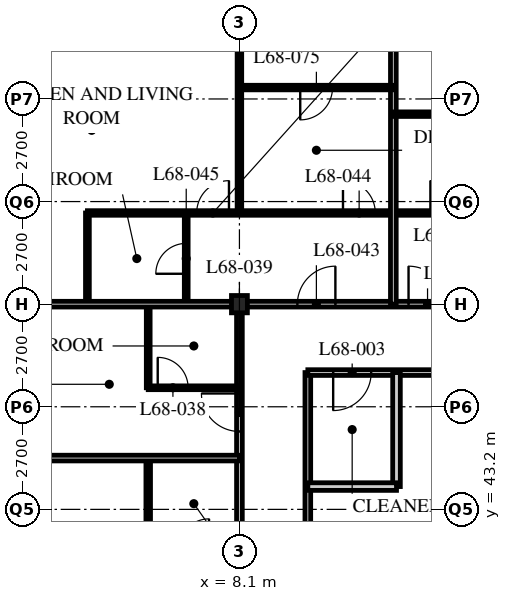
"""IFC4 building model, lengths in metres.
Left out: names, types, materials, properties, quantities, classifications, styles, units other than length and angle.
Written with IfcOpenShell. Run it as: python <this file> out.ifc"""

import sys

from ifc_helpers import new_model, si_unit, direction, frame, frame_2d, origin, origin_2d, place, context, subcontext, project, spatial, rectangle, i_section, extrude, element, fill, save


model = new_model("IFC4")
c1 = context("Model", 3, precision=1e-05, world=origin(), true_north=direction((0.0, 1.0)))
c2 = subcontext(c1, "Body", "Model", "MODEL_VIEW")
j1 = project(units=[si_unit("LENGTHUNIT", "METRE"), si_unit("PLANEANGLEUNIT", "RADIAN")], contexts=[c1])
p1 = place(None, origin())
s1 = spatial("IfcSite", under=j1, at=p1, CompositionType="ELEMENT")
p2 = place(p1, origin())
s2 = spatial("IfcBuilding", under=s1, at=p2, CompositionType="ELEMENT")
p3 = place(p2, frame((0.0, 0.0, 265.8)))
s3 = spatial("IfcBuildingStorey", under=s2, at=p3, CompositionType="ELEMENT", Elevation=265.8)
p4 = place(p3, frame((8.1, 48.6, 0.0), z_axis=(0.0, 0.0, 1.0), x_axis=(1.0, 0.0, 0.0)))
e1 = element("IfcColumn", 1, at=p4, inside=s3, PredefinedType="COLUMN", context=c2, shape_type="SweptSolid", body=[
    extrude(i_section(OverallWidth=0.418, OverallDepth=0.456, WebThickness=0.042, FlangeThickness=0.067, FilletRadius=0.015, at=origin_2d()), origin(), (0.0, 0.0, 1.0), 3.9),
])
p5 = place(p3, frame((8.1, 48.6, 0.0), z_axis=(0.0, 0.0, 1.0), x_axis=(1.0, 0.0, 0.0)))
e2 = element("IfcWall", 2, at=p5, inside=s3, PredefinedType="PARTITIONING", context=c2, shape_type="SweptSolid", body=[
    extrude(rectangle(XDim=28.35, YDim=0.15, at=frame_2d((14.175, 0.0))), origin(), (0.0, 0.0, 1.0), 3.078),
])
p6 = place(p5, frame((4.45, 0.0, 0.0)))
e3 = element("IfcOpeningElement", 3, at=p6, cuts=e2, PredefinedType="OPENING", context=c2, shape_type="SweptSolid", body=[
    extrude(rectangle(XDim=1.0, YDim=2.1, at=frame_2d((0.5, 1.05))), frame((0.0, 0.085, 0.0), z_axis=(0.0, -1.0, 0.0), x_axis=(1.0, 0.0, 0.0)), (0.0, 0.0, 1.0), 0.17),
])
p7 = place(p5, frame((20.65, 0.0, 0.0)))
e4 = element("IfcOpeningElement", 4, at=p7, cuts=e2, PredefinedType="OPENING", context=c2, shape_type="SweptSolid", body=[
    extrude(rectangle(XDim=1.0, YDim=2.1, at=frame_2d((0.5, 1.05))), frame((0.0, 0.085, 0.0), z_axis=(0.0, -1.0, 0.0), x_axis=(1.0, 0.0, 0.0)), (0.0, 0.0, 1.0), 0.17),
])
p8 = place(p5, frame((1.525, 0.0, 0.0)))
e5 = element("IfcOpeningElement", 5, at=p8, cuts=e2, PredefinedType="OPENING", context=c2, shape_type="SweptSolid", body=[
    extrude(rectangle(XDim=1.0, YDim=2.1, at=frame_2d((0.5, 1.05))), frame((0.0, 0.085, 0.0), z_axis=(0.0, -1.0, 0.0), x_axis=(1.0, 0.0, 0.0)), (0.0, 0.0, 1.0), 0.17),
])
p9 = place(p3, frame((8.1, 22.5, 0.0), z_axis=(0.0, 0.0, 1.0), x_axis=(0.0, 1.0, 0.0)))
e6 = element("IfcWall", 6, at=p9, inside=s3, PredefinedType="PARTITIONING", context=c2, shape_type="SweptSolid", body=[
    extrude(rectangle(XDim=26.1, YDim=0.15, at=frame_2d((13.05, 0.0))), origin(), (0.0, 0.0, 1.0), 3.078),
])
p10 = place(p9, frame((2.65, 0.0, 0.0)))
e7 = element("IfcOpeningElement", 7, at=p10, cuts=e6, PredefinedType="OPENING", context=c2, shape_type="SweptSolid", body=[
    extrude(rectangle(XDim=1.0, YDim=2.1, at=frame_2d((0.5, 1.05))), frame((0.0, 0.085, 0.0), z_axis=(0.0, -1.0, 0.0), x_axis=(1.0, 0.0, 0.0)), (0.0, 0.0, 1.0), 0.17),
])
p11 = place(p9, frame((22.75, 0.0, 0.0)))
e8 = element("IfcOpeningElement", 8, at=p11, cuts=e6, PredefinedType="OPENING", context=c2, shape_type="SweptSolid", body=[
    extrude(rectangle(XDim=1.0, YDim=2.1, at=frame_2d((0.5, 1.05))), frame((0.0, 0.085, 0.0), z_axis=(0.0, -1.0, 0.0), x_axis=(1.0, 0.0, 0.0)), (0.0, 0.0, 1.0), 0.17),
])
p12 = place(p3, frame((9.9, 24.3, 0.0), z_axis=(0.0, 0.0, 1.0), x_axis=(0.0, 1.0, 0.0)))
e9 = element("IfcWall", 9, at=p12, inside=s3, PredefinedType="PARTITIONING", context=c2, shape_type="SweptSolid", body=[
    extrude(rectangle(XDim=22.5, YDim=0.15, at=frame_2d((11.25, 0.0))), origin(), (0.0, 0.0, 1.0), 3.69),
])
p13 = place(p12, frame((3.55, 0.0, 0.0)))
e10 = element("IfcOpeningElement", 10, at=p13, cuts=e9, PredefinedType="OPENING", context=c2, shape_type="SweptSolid", body=[
    extrude(rectangle(XDim=1.0, YDim=2.1, at=frame_2d((0.5, 1.05))), frame((0.0, 0.085, 0.0), z_axis=(0.0, -1.0, 0.0), x_axis=(1.0, 0.0, 0.0)), (0.0, 0.0, 1.0), 0.17),
])
p14 = place(p12, frame((11.65, 0.0, 0.0)))
e11 = element("IfcOpeningElement", 11, at=p14, cuts=e9, PredefinedType="OPENING", context=c2, shape_type="SweptSolid", body=[
    extrude(rectangle(XDim=1.0, YDim=2.1, at=frame_2d((0.5, 1.05))), frame((0.0, 0.085, 0.0), z_axis=(0.0, -1.0, 0.0), x_axis=(1.0, 0.0, 0.0)), (0.0, 0.0, 1.0), 0.17),
])
p15 = place(p3, frame((9.9, 46.8, 0.0), z_axis=(0.0, 0.0, 1.0), x_axis=(1.0, 0.0, 0.0)))
e12 = element("IfcWall", 12, at=p15, inside=s3, PredefinedType="PARTITIONING", context=c2, shape_type="SweptSolid", body=[
    extrude(rectangle(XDim=17.24, YDim=0.15, at=frame_2d((8.62, 0.0))), origin(), (0.0, 0.0, 1.0), 3.69),
])
p16 = place(p15, frame((0.667, 0.0, 0.0)))
e13 = element("IfcOpeningElement", 13, at=p16, cuts=e12, PredefinedType="OPENING", context=c2, shape_type="SweptSolid", body=[
    extrude(rectangle(XDim=1.0, YDim=2.1, at=frame_2d((0.5, 1.05))), frame((0.0, 0.085, 0.0), z_axis=(0.0, -1.0, 0.0), x_axis=(1.0, 0.0, 0.0)), (0.0, 0.0, 1.0), 0.17),
])
p17 = place(p15, frame((3.817, 0.0, 0.0)))
e14 = element("IfcOpeningElement", 14, at=p17, cuts=e12, PredefinedType="OPENING", context=c2, shape_type="SweptSolid", body=[
    extrude(rectangle(XDim=1.0, YDim=2.1, at=frame_2d((0.5, 1.05))), frame((0.0, 0.085, 0.0), z_axis=(0.0, -1.0, 0.0), x_axis=(1.0, 0.0, 0.0)), (0.0, 0.0, 1.0), 0.17),
])
p18 = place(p15, frame((8.102, 0.0, 0.0)))
e15 = element("IfcOpeningElement", 15, at=p18, cuts=e12, PredefinedType="OPENING", context=c2, shape_type="SweptSolid", body=[
    extrude(rectangle(XDim=1.0, YDim=2.1, at=frame_2d((0.5, 1.05))), frame((0.0, 0.085, 0.0), z_axis=(0.0, -1.0, 0.0), x_axis=(1.0, 0.0, 0.0)), (0.0, 0.0, 1.0), 0.17),
])
p19 = place(p15, frame((13.577, 0.0, 0.0)))
e16 = element("IfcOpeningElement", 16, at=p19, cuts=e12, PredefinedType="OPENING", context=c2, shape_type="SweptSolid", body=[
    extrude(rectangle(XDim=1.0, YDim=2.1, at=frame_2d((0.5, 1.05))), frame((0.0, 0.085, 0.0), z_axis=(0.0, -1.0, 0.0), x_axis=(1.0, 0.0, 0.0)), (0.0, 0.0, 1.0), 0.17),
])
p20 = place(p3, frame((12.233, 46.8, 0.0), z_axis=(0.0, 0.0, 1.0), x_axis=(0.0, -1.0, 0.0)))
e17 = element("IfcWall", 17, at=p20, inside=s3, PredefinedType="SOLIDWALL", context=c2, shape_type="SweptSolid", body=[
    extrude(rectangle(XDim=3.0, YDim=0.2, at=frame_2d((1.5, 0.0))), origin(), (0.0, 0.0, 1.0), 3.69),
])
p21 = place(p3, frame((9.9, 43.8, 0.0), z_axis=(0.0, 0.0, 1.0), x_axis=(1.0, 0.0, 0.0)))
e18 = element("IfcWall", 18, at=p21, inside=s3, PredefinedType="SOLIDWALL", context=c2, shape_type="SweptSolid", body=[
    extrude(rectangle(XDim=2.333, YDim=0.2, at=frame_2d((1.167, 0.0))), origin(), (0.0, 0.0, 1.0), 3.69),
])
p22 = place(p3, frame((5.7, 22.5, 0.0), z_axis=(0.0, 0.0, 1.0), x_axis=(0.0, 1.0, 0.0)))
e19 = element("IfcWall", 19, at=p22, inside=s3, PredefinedType="PARTITIONING", context=c2, shape_type="SweptSolid", body=[
    extrude(rectangle(XDim=22.05, YDim=0.12, at=frame_2d((11.025, 0.0))), origin(), (0.0, 0.0, 1.0), 3.69),
])
p23 = place(p22, frame((0.975, 0.0, 0.0)))
e20 = element("IfcOpeningElement", 20, at=p23, cuts=e19, PredefinedType="OPENING", context=c2, shape_type="SweptSolid", body=[
    extrude(rectangle(XDim=0.85, YDim=2.1, at=frame_2d((0.425, 1.05))), frame((0.0, 0.07, 0.0), z_axis=(0.0, -1.0, 0.0), x_axis=(1.0, 0.0, 0.0)), (0.0, 0.0, 1.0), 0.14),
])
p24 = place(p22, frame((10.225, 0.0, 0.0)))
e21 = element("IfcOpeningElement", 21, at=p24, cuts=e19, PredefinedType="OPENING", context=c2, shape_type="SweptSolid", body=[
    extrude(rectangle(XDim=0.85, YDim=2.1, at=frame_2d((0.425, 1.05))), frame((0.0, 0.07, 0.0), z_axis=(0.0, -1.0, 0.0), x_axis=(1.0, 0.0, 0.0)), (0.0, 0.0, 1.0), 0.14),
])
p25 = place(p22, frame((14.275, 0.0, 0.0)))
e22 = element("IfcOpeningElement", 22, at=p25, cuts=e19, PredefinedType="OPENING", context=c2, shape_type="SweptSolid", body=[
    extrude(rectangle(XDim=0.85, YDim=2.1, at=frame_2d((0.425, 1.05))), frame((0.0, 0.07, 0.0), z_axis=(0.0, -1.0, 0.0), x_axis=(1.0, 0.0, 0.0)), (0.0, 0.0, 1.0), 0.14),
])
p26 = place(p22, frame((18.325, 0.0, 0.0)))
e23 = element("IfcOpeningElement", 23, at=p26, cuts=e19, PredefinedType="OPENING", context=c2, shape_type="SweptSolid", body=[
    extrude(rectangle(XDim=0.85, YDim=2.1, at=frame_2d((0.425, 1.05))), frame((0.0, 0.07, 0.0), z_axis=(0.0, -1.0, 0.0), x_axis=(1.0, 0.0, 0.0)), (0.0, 0.0, 1.0), 0.14),
])
p27 = place(p3, frame((8.1, 44.55, 0.0), z_axis=(0.0, 0.0, 1.0), x_axis=(-1.0, 0.0, 0.0)))
e24 = element("IfcWall", 24, at=p27, inside=s3, PredefinedType="PARTITIONING", context=c2, shape_type="SweptSolid", body=[
    extrude(rectangle(XDim=7.8, YDim=0.15, at=frame_2d((3.9, 0.0))), origin(), (0.0, 0.0, 1.0), 3.69),
])
p28 = place(p3, frame((5.7, 46.4, 0.0), z_axis=(0.0, 0.0, 1.0), x_axis=(0.0, 1.0, 0.0)))
e25 = element("IfcWall", 25, at=p28, inside=s3, PredefinedType="PARTITIONING", context=c2, shape_type="SweptSolid", body=[
    extrude(rectangle(XDim=2.2, YDim=0.1, at=frame_2d((1.1, 0.0))), origin(), (0.0, 0.0, 1.0), 3.69),
])
p29 = place(p3, frame((8.1, 46.4, 0.0), z_axis=(0.0, 0.0, 1.0), x_axis=(-1.0, 0.0, 0.0)))
e26 = element("IfcWall", 26, at=p29, inside=s3, PredefinedType="PARTITIONING", context=c2, shape_type="SweptSolid", body=[
    extrude(rectangle(XDim=2.4, YDim=0.1, at=frame_2d((1.2, 0.0))), origin(), (0.0, 0.0, 1.0), 3.69),
])
p30 = place(p29, frame((1.35, 0.0, 0.0)))
e27 = element("IfcOpeningElement", 27, at=p30, cuts=e26, PredefinedType="OPENING", context=c2, shape_type="SweptSolid", body=[
    extrude(rectangle(XDim=0.8, YDim=2.1, at=frame_2d((0.4, 1.05))), frame((0.0, 0.06, 0.0), z_axis=(0.0, -1.0, 0.0), x_axis=(1.0, 0.0, 0.0)), (0.0, 0.0, 1.0), 0.12),
])
p31 = place(p3, frame((6.7, 48.6, 0.0), z_axis=(0.0, 0.0, 1.0), x_axis=(0.0, 1.0, 0.0)))
e28 = element("IfcWall", 28, at=p31, inside=s3, PredefinedType="PARTITIONING", context=c2, shape_type="SweptSolid", body=[
    extrude(rectangle(XDim=2.4, YDim=0.1, at=frame_2d((1.2, 0.0))), origin(), (0.0, 0.0, 1.0), 3.69),
])
p32 = place(p31, frame((0.8, 0.0, 0.0)))
e29 = element("IfcOpeningElement", 29, at=p32, cuts=e28, PredefinedType="OPENING", context=c2, shape_type="SweptSolid", body=[
    extrude(rectangle(XDim=0.8, YDim=2.1, at=frame_2d((0.4, 1.05))), frame((0.0, 0.06, 0.0), z_axis=(0.0, -1.0, 0.0), x_axis=(1.0, 0.0, 0.0)), (0.0, 0.0, 1.0), 0.12),
])
p33 = place(p3, frame((4.1, 48.6, 0.0), z_axis=(0.0, 0.0, 1.0), x_axis=(0.0, 1.0, 0.0)))
e30 = element("IfcWall", 30, at=p33, inside=s3, PredefinedType="PARTITIONING", context=c2, shape_type="SweptSolid", body=[
    extrude(rectangle(XDim=2.4, YDim=0.1, at=frame_2d((1.2, 0.0))), origin(), (0.0, 0.0, 1.0), 3.69),
])
p34 = place(p3, frame((4.1, 51.0, 0.0), z_axis=(0.0, 0.0, 1.0), x_axis=(1.0, 0.0, 0.0)))
e31 = element("IfcWall", 31, at=p34, inside=s3, PredefinedType="PARTITIONING", context=c2, shape_type="SweptSolid", body=[
    extrude(rectangle(XDim=32.35, YDim=0.12, at=frame_2d((16.175, 0.0))), origin(), (0.0, 0.0, 1.0), 3.69),
])
p35 = place(p34, frame((9.025, 0.0, 0.0)))
e32 = element("IfcOpeningElement", 32, at=p35, cuts=e31, PredefinedType="OPENING", context=c2, shape_type="SweptSolid", body=[
    extrude(rectangle(XDim=0.85, YDim=2.1, at=frame_2d((0.425, 1.05))), frame((0.0, 0.07, 0.0), z_axis=(0.0, -1.0, 0.0), x_axis=(1.0, 0.0, 0.0)), (0.0, 0.0, 1.0), 0.14),
])
p36 = place(p34, frame((16.475, 0.0, 0.0)))
e33 = element("IfcOpeningElement", 33, at=p36, cuts=e31, PredefinedType="OPENING", context=c2, shape_type="SweptSolid", body=[
    extrude(rectangle(XDim=0.85, YDim=2.1, at=frame_2d((0.425, 1.05))), frame((0.0, 0.07, 0.0), z_axis=(0.0, -1.0, 0.0), x_axis=(1.0, 0.0, 0.0)), (0.0, 0.0, 1.0), 0.14),
])
p37 = place(p34, frame((20.525, 0.0, 0.0)))
e34 = element("IfcOpeningElement", 34, at=p37, cuts=e31, PredefinedType="OPENING", context=c2, shape_type="SweptSolid", body=[
    extrude(rectangle(XDim=0.85, YDim=2.1, at=frame_2d((0.425, 1.05))), frame((0.0, 0.07, 0.0), z_axis=(0.0, -1.0, 0.0), x_axis=(1.0, 0.0, 0.0)), (0.0, 0.0, 1.0), 0.14),
])
p38 = place(p34, frame((25.225, 0.0, 0.0)))
e35 = element("IfcOpeningElement", 35, at=p38, cuts=e31, PredefinedType="OPENING", context=c2, shape_type="SweptSolid", body=[
    extrude(rectangle(XDim=0.85, YDim=2.1, at=frame_2d((0.425, 1.05))), frame((0.0, 0.07, 0.0), z_axis=(0.0, -1.0, 0.0), x_axis=(1.0, 0.0, 0.0)), (0.0, 0.0, 1.0), 0.14),
])
p39 = place(p34, frame((28.625, 0.0, 0.0)))
e36 = element("IfcOpeningElement", 36, at=p39, cuts=e31, PredefinedType="OPENING", context=c2, shape_type="SweptSolid", body=[
    extrude(rectangle(XDim=0.85, YDim=2.1, at=frame_2d((0.425, 1.05))), frame((0.0, 0.07, 0.0), z_axis=(0.0, -1.0, 0.0), x_axis=(1.0, 0.0, 0.0)), (0.0, 0.0, 1.0), 0.14),
])
p40 = place(p34, frame((6.725, 0.0, 0.0)))
e37 = element("IfcOpeningElement", 37, at=p40, cuts=e31, PredefinedType="OPENING", context=c2, shape_type="SweptSolid", body=[
    extrude(rectangle(XDim=0.85, YDim=2.1, at=frame_2d((0.425, 1.05))), frame((0.0, 0.07, 0.0), z_axis=(0.0, -1.0, 0.0), x_axis=(1.0, 0.0, 0.0)), (0.0, 0.0, 1.0), 0.14),
])
p41 = place(p34, frame((2.875, 0.0, 0.0)))
e38 = element("IfcOpeningElement", 38, at=p41, cuts=e31, PredefinedType="OPENING", context=c2, shape_type="SweptSolid", body=[
    extrude(rectangle(XDim=0.85, YDim=2.1, at=frame_2d((0.425, 1.05))), frame((0.0, 0.07, 0.0), z_axis=(0.0, -1.0, 0.0), x_axis=(1.0, 0.0, 0.0)), (0.0, 0.0, 1.0), 0.14),
])
p42 = place(p3, frame((8.1, 51.0, 0.0), z_axis=(0.0, 0.0, 1.0), x_axis=(0.0, 1.0, 0.0)))
e39 = element("IfcWall", 39, at=p42, inside=s3, PredefinedType="PARTITIONING", context=c2, shape_type="SweptSolid", body=[
    extrude(rectangle(XDim=9.45, YDim=0.12, at=frame_2d((4.725, 0.0))), origin(), (0.0, 0.0, 1.0), 3.078),
])
p43 = place(p3, frame((0.3, 48.6, 0.0), z_axis=(0.0, 0.0, 1.0), x_axis=(1.0, 0.0, 0.0)))
e40 = element("IfcWall", 40, at=p43, inside=s3, PredefinedType="PARTITIONING", context=c2, shape_type="SweptSolid", body=[
    extrude(rectangle(XDim=7.8, YDim=0.15, at=frame_2d((3.9, 0.0))), origin(), (0.0, 0.0, 1.0), 3.078),
])
p44 = place(p3, frame((12.15, 48.6, 0.0), z_axis=(0.0, 0.0, 1.0), x_axis=(0.0, 1.0, 0.0)))
e41 = element("IfcWall", 41, at=p44, inside=s3, PredefinedType="PARTITIONING", context=c2, shape_type="SweptSolid", body=[
    extrude(rectangle(XDim=15.9, YDim=0.15, at=frame_2d((7.95, 0.0))), origin(), (0.0, 0.0, 1.0), 3.69),
])
p45 = place(p3, frame((12.15, 53.6, 0.0), z_axis=(0.0, 0.0, 1.0), x_axis=(1.0, 0.0, 0.0)))
e42 = element("IfcWall", 42, at=p45, inside=s3, PredefinedType="PARTITIONING", context=c2, shape_type="SweptSolid", body=[
    extrude(rectangle(XDim=8.1, YDim=0.12, at=frame_2d((4.05, 0.0))), origin(), (0.0, 0.0, 1.0), 3.69),
])
p46 = place(p45, frame((1.675, 0.0, 0.0)))
e43 = element("IfcOpeningElement", 43, at=p46, cuts=e42, PredefinedType="OPENING", context=c2, shape_type="SweptSolid", body=[
    extrude(rectangle(XDim=0.85, YDim=2.1, at=frame_2d((0.425, 1.05))), frame((0.0, 0.07, 0.0), z_axis=(0.0, -1.0, 0.0), x_axis=(1.0, 0.0, 0.0)), (0.0, 0.0, 1.0), 0.14),
])
p47 = place(p3, frame((8.1, 54.3, 0.0), z_axis=(0.0, 0.0, 1.0), x_axis=(1.0, 0.0, 0.0)))
e44 = element("IfcWall", 44, at=p47, inside=s3, PredefinedType="PARTITIONING", context=c2, shape_type="SweptSolid", body=[
    extrude(rectangle(XDim=4.05, YDim=0.12, at=frame_2d((2.025, 0.0))), origin(), (0.0, 0.0, 1.0), 3.69),
])
p48 = place(p47, frame((1.6, 0.0, 0.0)))
e45 = element("IfcOpeningElement", 45, at=p48, cuts=e44, PredefinedType="OPENING", context=c2, shape_type="SweptSolid", body=[
    extrude(rectangle(XDim=0.85, YDim=2.1, at=frame_2d((0.425, 1.05))), frame((0.0, 0.07, 0.0), z_axis=(0.0, -1.0, 0.0), x_axis=(1.0, 0.0, 0.0)), (0.0, 0.0, 1.0), 0.14),
])
p49 = place(p16, origin())
e46 = element("IfcDoor", 46, at=p49, inside=s3, OperationType="SINGLE_SWING_RIGHT", PredefinedType="DOOR", context=c2, shape_type="SweptSolid", body=[
    extrude(rectangle(XDim=1.0, YDim=2.1, at=frame_2d((0.5, 1.05))), frame((0.0, 0.025, 0.0), z_axis=(0.0, -1.0, 0.0), x_axis=(1.0, 0.0, 0.0)), (0.0, 0.0, 1.0), 0.05),
])
fill(e13, e46)
p50 = place(p6, origin())
e47 = element("IfcDoor", 47, at=p50, inside=s3, OperationType="SINGLE_SWING_LEFT", PredefinedType="DOOR", context=c2, shape_type="SweptSolid", body=[
    extrude(rectangle(XDim=1.0, YDim=2.1, at=frame_2d((0.5, 1.05))), frame((0.0, 0.025, 0.0), z_axis=(0.0, -1.0, 0.0), x_axis=(1.0, 0.0, 0.0)), (0.0, 0.0, 1.0), 0.05),
])
fill(e3, e47)
p51 = place(p35, origin())
e48 = element("IfcDoor", 48, at=p51, inside=s3, OperationType="SINGLE_SWING_LEFT", PredefinedType="DOOR", context=c2, shape_type="SweptSolid", body=[
    extrude(rectangle(XDim=0.85, YDim=2.1, at=frame_2d((0.425, 1.05))), frame((0.0, 0.025, 0.0), z_axis=(0.0, -1.0, 0.0), x_axis=(1.0, 0.0, 0.0)), (0.0, 0.0, 1.0), 0.05),
])
fill(e32, e48)
p52 = place(p30, origin())
e49 = element("IfcDoor", 49, at=p52, inside=s3, OperationType="SINGLE_SWING_LEFT", PredefinedType="DOOR", context=c2, shape_type="SweptSolid", body=[
    extrude(rectangle(XDim=0.8, YDim=2.1, at=frame_2d((0.4, 1.05))), frame((0.0, 0.025, 0.0), z_axis=(0.0, -1.0, 0.0), x_axis=(1.0, 0.0, 0.0)), (0.0, 0.0, 1.0), 0.05),
])
fill(e27, e49)
p53 = place(p11, origin())
e50 = element("IfcDoor", 50, at=p53, inside=s3, OperationType="SINGLE_SWING_RIGHT", PredefinedType="DOOR", context=c2, shape_type="SweptSolid", body=[
    extrude(rectangle(XDim=1.0, YDim=2.1, at=frame_2d((0.5, 1.05))), frame((0.0, 0.025, 0.0), z_axis=(0.0, -1.0, 0.0), x_axis=(1.0, 0.0, 0.0)), (0.0, 0.0, 1.0), 0.05),
])
fill(e8, e50)
p54 = place(p8, origin())
e51 = element("IfcDoor", 51, at=p54, inside=s3, OperationType="SINGLE_SWING_RIGHT", PredefinedType="DOOR", context=c2, shape_type="SweptSolid", body=[
    extrude(rectangle(XDim=1.0, YDim=2.1, at=frame_2d((0.5, 1.05))), frame((0.0, 0.025, 0.0), z_axis=(0.0, -1.0, 0.0), x_axis=(1.0, 0.0, 0.0)), (0.0, 0.0, 1.0), 0.05),
])
fill(e5, e51)
p55 = place(p40, origin())
e52 = element("IfcDoor", 52, at=p55, inside=s3, OperationType="SINGLE_SWING_LEFT", PredefinedType="DOOR", context=c2, shape_type="SweptSolid", body=[
    extrude(rectangle(XDim=0.85, YDim=2.1, at=frame_2d((0.425, 1.05))), frame((0.0, 0.025, 0.0), z_axis=(0.0, -1.0, 0.0), x_axis=(1.0, 0.0, 0.0)), (0.0, 0.0, 1.0), 0.05),
])
fill(e37, e52)
p56 = place(p32, origin())
e53 = element("IfcDoor", 53, at=p56, inside=s3, OperationType="SINGLE_SWING_LEFT", PredefinedType="DOOR", context=c2, shape_type="SweptSolid", body=[
    extrude(rectangle(XDim=0.8, YDim=2.1, at=frame_2d((0.4, 1.05))), frame((0.0, 0.025, 0.0), z_axis=(0.0, -1.0, 0.0), x_axis=(1.0, 0.0, 0.0)), (0.0, 0.0, 1.0), 0.05),
])
fill(e29, e53)
p57 = place(p41, origin())
e54 = element("IfcDoor", 54, at=p57, inside=s3, OperationType="SINGLE_SWING_RIGHT", PredefinedType="DOOR", context=c2, shape_type="SweptSolid", body=[
    extrude(rectangle(XDim=0.85, YDim=2.1, at=frame_2d((0.425, 1.05))), frame((0.0, 0.025, 0.0), z_axis=(0.0, -1.0, 0.0), x_axis=(1.0, 0.0, 0.0)), (0.0, 0.0, 1.0), 0.05),
])
fill(e38, e54)
p58 = place(p48, origin())
e55 = element("IfcDoor", 55, at=p58, inside=s3, OperationType="SINGLE_SWING_RIGHT", PredefinedType="DOOR", context=c2, shape_type="SweptSolid", body=[
    extrude(rectangle(XDim=0.85, YDim=2.1, at=frame_2d((0.425, 1.05))), frame((0.0, 0.025, 0.0), z_axis=(0.0, -1.0, 0.0), x_axis=(1.0, 0.0, 0.0)), (0.0, 0.0, 1.0), 0.05),
])
fill(e45, e55)
save(model, sys.argv[1])
